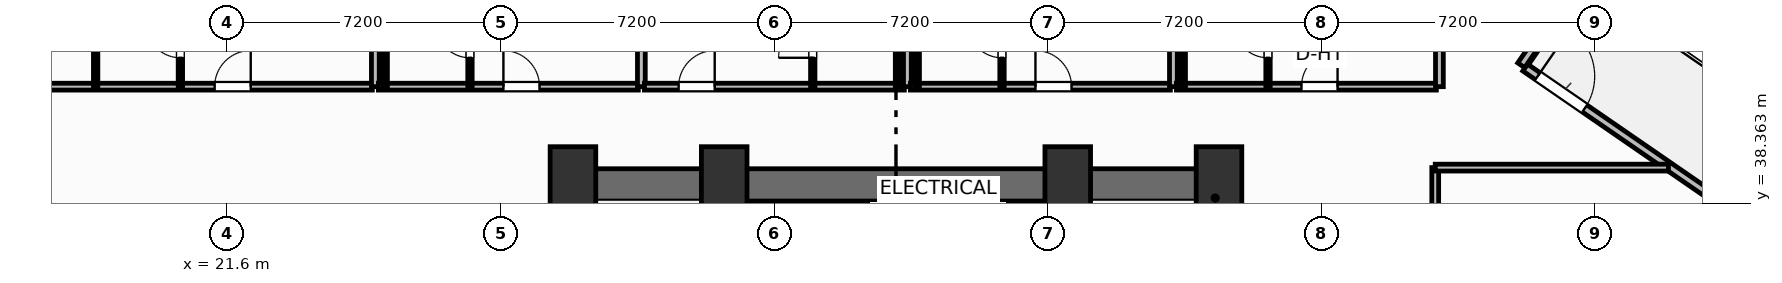
"""IFC4 building model, lengths in metres.
Left out: names, types, materials, properties, quantities, classifications, styles, units other than length and angle.
Written with IfcOpenShell. Run it as: python <this file> out.ifc"""

import sys

from ifc_helpers import new_model, si_unit, direction, frame, frame_2d, origin, origin_2d, place, context, subcontext, project, spatial, rectangle, extrude, element, fill, save


model = new_model("IFC4")
c1 = context("Model", 3, precision=1e-05, world=origin(), true_north=direction((0.0, 1.0)))
c2 = subcontext(c1, "Body", "Model", "MODEL_VIEW")
j1 = project(units=[si_unit("LENGTHUNIT", "METRE"), si_unit("PLANEANGLEUNIT", "RADIAN")], contexts=[c1])
p1 = place(None, origin())
s1 = spatial("IfcSite", under=j1, at=p1, CompositionType="ELEMENT")
p2 = place(p1, origin())
s2 = spatial("IfcBuilding", under=s1, at=p2, CompositionType="ELEMENT")
p3 = place(p2, frame((0.0, 0.0, 27.0)))
s3 = spatial("IfcBuildingStorey", under=s2, at=p3, CompositionType="ELEMENT", Elevation=27.0)
for number, where, z_axis, x_axis in (
    (1, (30.7, 39.05, 0.0), (0.0, 0.0, 1.0), (1.0, 0.0, 0.0)),
    (2, (34.68, 39.05, 0.0), (0.0, 0.0, 1.0), (1.0, 0.0, 0.0)),
    (3, (43.72, 39.05, 0.0), (0.0, 0.0, 1.0), (1.0, 0.0, 0.0)),
    (4, (47.7, 39.05, 0.0), (0.0, 0.0, 1.0), (1.0, 0.0, 0.0)),
):
    element("IfcColumn", number, at=place(p3, frame(where, z_axis=z_axis, x_axis=x_axis)), inside=s3, PredefinedType="COLUMN", context=c2, shape_type="SweptSolid", body=[
        extrude(rectangle(XDim=1.2, YDim=1.6, at=origin_2d()), origin(), (0.0, 0.0, 1.0), 3.7),
    ])
p4 = place(p3, frame((30.28, 38.845, 0.0), z_axis=(0.0, 0.0, 1.0), x_axis=(1.0, 0.0, 0.0)))
e5 = element("IfcWall", 5, at=p4, inside=s3, PredefinedType="SHEAR", context=c2, shape_type="SweptSolid", body=[
    extrude(rectangle(XDim=17.84, YDim=0.85, at=frame_2d((8.92, 0.0))), origin(), (0.0, 0.0, 1.0), 3.45),
])
for number, where, z_axis, x_axis in (
    (6, (30.705, 29.2, 0.0), (0.0, 0.0, 1.0), (0.0, 1.0, 0.0)),
    (7, (47.695, 29.2, 0.0), (0.0, 0.0, 1.0), (0.0, 1.0, 0.0)),
):
    element("IfcWall", number, at=place(p3, frame(where, z_axis=z_axis, x_axis=x_axis)), inside=s3, PredefinedType="SHEAR", context=c2, shape_type="SweptSolid", body=[
        extrude(rectangle(XDim=9.22, YDim=0.85, at=frame_2d((4.61, 0.0))), origin(), (0.0, 0.0, 1.0), 3.45),
    ])
p5 = place(p3, frame((34.64, 29.2, 0.0), z_axis=(0.0, 0.0, 1.0), x_axis=(0.0, 1.0, 0.0)))
e8 = element("IfcWall", 8, at=p5, inside=s3, PredefinedType="SHEAR", context=c2, shape_type="SweptSolid", body=[
    extrude(rectangle(XDim=9.22, YDim=0.25, at=frame_2d((4.61, 0.0))), origin(), (0.0, 0.0, 1.0), 3.45),
])
p6 = place(p5, frame((0.65, 0.0, 0.0)))
e9 = element("IfcOpeningElement", 9, at=p6, cuts=e8, PredefinedType="OPENING", context=c2, shape_type="SweptSolid", body=[
    extrude(rectangle(XDim=1.05, YDim=2.15, at=frame_2d((0.525, 1.075))), frame((0.0, 0.135, 0.0), z_axis=(0.0, -1.0, 0.0), x_axis=(1.0, 0.0, 0.0)), (0.0, 0.0, 1.0), 0.27),
])
p7 = place(p3, frame((43.76, 29.2, 0.0), z_axis=(0.0, 0.0, 1.0), x_axis=(0.0, 1.0, 0.0)))
e10 = element("IfcWall", 10, at=p7, inside=s3, PredefinedType="SHEAR", context=c2, shape_type="SweptSolid", body=[
    extrude(rectangle(XDim=9.22, YDim=0.25, at=frame_2d((4.61, 0.0))), origin(), (0.0, 0.0, 1.0), 3.45),
])
p8 = place(p7, frame((0.65, 0.0, 0.0)))
e11 = element("IfcOpeningElement", 11, at=p8, cuts=e10, PredefinedType="OPENING", context=c2, shape_type="SweptSolid", body=[
    extrude(rectangle(XDim=1.05, YDim=2.15, at=frame_2d((0.525, 1.075))), frame((0.0, 0.135, 0.0), z_axis=(0.0, -1.0, 0.0), x_axis=(1.0, 0.0, 0.0)), (0.0, 0.0, 1.0), 0.27),
])
p9 = place(p3, frame((55.757, 41.933, 0.0), z_axis=(0.0, 0.0, 1.0), x_axis=(0.823534636215, -0.567265989598, 0.0)))
e12 = element("IfcWall", 12, at=p9, inside=s3, PredefinedType="SOLIDWALL", context=c2, shape_type="SweptSolid", body=[
    extrude(rectangle(XDim=6.0, YDim=0.22, at=frame_2d((3.0, 0.0))), origin(), (0.0, 0.0, 1.0), 2.73),
])
p10 = place(p9, frame((0.4, 0.0, 0.0)))
e13 = element("IfcOpeningElement", 13, at=p10, cuts=e12, PredefinedType="OPENING", context=c2, shape_type="SweptSolid", body=[
    extrude(rectangle(XDim=1.5, YDim=2.25, at=frame_2d((0.75, 1.125))), frame((0.0, 0.12, 0.0), z_axis=(0.0, -1.0, 0.0), x_axis=(1.0, 0.0, 0.0)), (0.0, 0.0, 1.0), 0.24),
])
p11 = place(p3, frame((55.653, 41.993, 0.0), z_axis=(0.0, 0.0, 1.0), x_axis=(0.567273696173, 0.823529327729, 0.0)))
e14 = element("IfcWall", 14, at=p11, inside=s3, PredefinedType="SOLIDWALL", context=c2, shape_type="SweptSolid", body=[
    extrude(rectangle(XDim=2.1, YDim=0.22, at=frame_2d((1.05, 0.0))), origin(), (0.0, 0.0, 1.0), 2.73),
])
p12 = place(p3, frame((2.921, 41.43, 0.0), z_axis=(0.0, 0.0, 1.0), x_axis=(1.0, 0.0, 0.0)))
e15 = element("IfcWall", 15, at=p12, inside=s3, PredefinedType="PARTITIONING", context=c2, shape_type="SweptSolid", body=[
    extrude(rectangle(XDim=22.499, YDim=0.18, at=frame_2d((11.25, 0.0))), origin(), (0.0, 0.0, 1.0), 3.45),
])
p13 = place(p12, frame((18.35, 0.0, 0.0)))
e16 = element("IfcOpeningElement", 16, at=p13, cuts=e15, PredefinedType="OPENING", context=c2, shape_type="SweptSolid", body=[
    extrude(rectangle(XDim=0.95, YDim=2.15, at=frame_2d((0.475, 1.075))), frame((0.0, 0.1, 0.0), z_axis=(0.0, -1.0, 0.0), x_axis=(1.0, 0.0, 0.0)), (0.0, 0.0, 1.0), 0.2),
])
p14 = place(p3, frame((20.37, 41.43, 0.0), z_axis=(0.0, 0.0, 1.0), x_axis=(0.0, 1.0, 0.0)))
e17 = element("IfcWall", 17, at=p14, inside=s3, PredefinedType="PARTITIONING", context=c2, shape_type="SweptSolid", body=[
    extrude(rectangle(XDim=2.52, YDim=0.115, at=frame_2d((1.26, 0.0))), origin(), (0.0, 0.0, 1.0), 3.45),
])
p15 = place(p14, frame((0.76, 0.0, 0.0)))
e18 = element("IfcOpeningElement", 18, at=p15, cuts=e17, PredefinedType="OPENING", context=c2, shape_type="SweptSolid", body=[
    extrude(rectangle(XDim=0.9, YDim=2.05, at=frame_2d((0.45, 1.025))), frame((0.0, 0.067, 0.0), z_axis=(0.0, -1.0, 0.0), x_axis=(1.0, 0.0, 0.0)), (0.0, 0.0, 1.0), 0.135),
])
p16 = place(p3, frame((18.14, 41.43, 0.0), z_axis=(0.0, 0.0, 1.0), x_axis=(0.0, 1.0, 0.0)))
e19 = element("IfcWall", 19, at=p16, inside=s3, PredefinedType="PARTITIONING", context=c2, shape_type="SweptSolid", body=[
    extrude(rectangle(XDim=2.52, YDim=0.115, at=frame_2d((1.26, 0.0))), origin(), (0.0, 0.0, 1.0), 3.45),
])
p17 = place(p3, frame((25.5, 41.43, 0.0), z_axis=(0.0, 0.0, 1.0), x_axis=(0.0, 1.0, 0.0)))
e20 = element("IfcWall", 20, at=p17, inside=s3, PredefinedType="PARTITIONING", context=c2, shape_type="SweptSolid", body=[
    extrude(rectangle(XDim=14.57, YDim=0.205, at=frame_2d((7.285, 0.0))), origin(), (0.0, 0.0, 1.0), 3.45),
])
p18 = place(p3, frame((25.58, 41.43, 0.0), z_axis=(0.0, 0.0, 1.0), x_axis=(1.0, 0.0, 0.0)))
e21 = element("IfcWall", 21, at=p18, inside=s3, PredefinedType="PARTITIONING", context=c2, shape_type="SweptSolid", body=[
    extrude(rectangle(XDim=6.84, YDim=0.18, at=frame_2d((3.42, 0.0))), origin(), (0.0, 0.0, 1.0), 3.45),
])
p19 = place(p18, frame((3.29, 0.0, 0.0)))
e22 = element("IfcOpeningElement", 22, at=p19, cuts=e21, PredefinedType="OPENING", context=c2, shape_type="SweptSolid", body=[
    extrude(rectangle(XDim=0.95, YDim=2.15, at=frame_2d((0.475, 1.075))), frame((0.0, 0.1, 0.0), z_axis=(0.0, -1.0, 0.0), x_axis=(1.0, 0.0, 0.0)), (0.0, 0.0, 1.0), 0.2),
])
p20 = place(p3, frame((27.99, 41.43, 0.0), z_axis=(0.0, 0.0, 1.0), x_axis=(0.0, 1.0, 0.0)))
e23 = element("IfcWall", 23, at=p20, inside=s3, PredefinedType="PARTITIONING", context=c2, shape_type="SweptSolid", body=[
    extrude(rectangle(XDim=2.52, YDim=0.115, at=frame_2d((1.26, 0.0))), origin(), (0.0, 0.0, 1.0), 3.45),
])
p21 = place(p20, frame((0.76, 0.0, 0.0)))
e24 = element("IfcOpeningElement", 24, at=p21, cuts=e23, PredefinedType="OPENING", context=c2, shape_type="SweptSolid", body=[
    extrude(rectangle(XDim=0.9, YDim=2.05, at=frame_2d((0.45, 1.025))), frame((0.0, 0.067, 0.0), z_axis=(0.0, -1.0, 0.0), x_axis=(1.0, 0.0, 0.0)), (0.0, 0.0, 1.0), 0.135),
])
p22 = place(p3, frame((25.76, 41.43, 0.0), z_axis=(0.0, 0.0, 1.0), x_axis=(0.0, 1.0, 0.0)))
e25 = element("IfcWall", 25, at=p22, inside=s3, PredefinedType="PARTITIONING", context=c2, shape_type="SweptSolid", body=[
    extrude(rectangle(XDim=2.52, YDim=0.115, at=frame_2d((1.26, 0.0))), origin(), (0.0, 0.0, 1.0), 3.45),
])
p23 = place(p3, frame((32.5, 41.43, 0.0), z_axis=(0.0, 0.0, 1.0), x_axis=(0.0, 1.0, 0.0)))
e26 = element("IfcWall", 26, at=p23, inside=s3, PredefinedType="PARTITIONING", context=c2, shape_type="SweptSolid", body=[
    extrude(rectangle(XDim=14.57, YDim=0.205, at=frame_2d((7.285, 0.0))), origin(), (0.0, 0.0, 1.0), 3.45),
])
p24 = place(p3, frame((32.58, 41.43, 0.0), z_axis=(0.0, 0.0, 1.0), x_axis=(1.0, 0.0, 0.0)))
e27 = element("IfcWall", 27, at=p24, inside=s3, PredefinedType="PARTITIONING", context=c2, shape_type="SweptSolid", body=[
    extrude(rectangle(XDim=6.84, YDim=0.18, at=frame_2d((3.42, 0.0))), origin(), (0.0, 0.0, 1.0), 3.45),
])
p25 = place(p24, frame((0.9, 0.0, 0.0)))
e28 = element("IfcOpeningElement", 28, at=p25, cuts=e27, PredefinedType="OPENING", context=c2, shape_type="SweptSolid", body=[
    extrude(rectangle(XDim=0.95, YDim=2.15, at=frame_2d((0.475, 1.075))), frame((0.0, 0.1, 0.0), z_axis=(0.0, -1.0, 0.0), x_axis=(1.0, 0.0, 0.0)), (0.0, 0.0, 1.0), 0.2),
])
p26 = place(p3, frame((37.01, 41.43, 0.0), z_axis=(0.0, 0.0, 1.0), x_axis=(0.0, 1.0, 0.0)))
e29 = element("IfcWall", 29, at=p26, inside=s3, PredefinedType="PARTITIONING", context=c2, shape_type="SweptSolid", body=[
    extrude(rectangle(XDim=2.52, YDim=0.115, at=frame_2d((1.26, 0.0))), origin(), (0.0, 0.0, 1.0), 3.45),
])
p27 = place(p26, frame((0.76, 0.0, 0.0)))
e30 = element("IfcOpeningElement", 30, at=p27, cuts=e29, PredefinedType="OPENING", context=c2, shape_type="SweptSolid", body=[
    extrude(rectangle(XDim=0.9, YDim=2.05, at=frame_2d((0.45, 1.025))), frame((0.0, 0.067, 0.0), z_axis=(0.0, -1.0, 0.0), x_axis=(1.0, 0.0, 0.0)), (0.0, 0.0, 1.0), 0.135),
])
p28 = place(p3, frame((39.24, 41.43, 0.0), z_axis=(0.0, 0.0, 1.0), x_axis=(0.0, 1.0, 0.0)))
e31 = element("IfcWall", 31, at=p28, inside=s3, PredefinedType="PARTITIONING", context=c2, shape_type="SweptSolid", body=[
    extrude(rectangle(XDim=2.52, YDim=0.115, at=frame_2d((1.26, 0.0))), origin(), (0.0, 0.0, 1.0), 3.45),
])
p29 = place(p3, frame((39.5, 41.43, 0.0), z_axis=(0.0, 0.0, 1.0), x_axis=(0.0, 1.0, 0.0)))
e32 = element("IfcWall", 32, at=p29, inside=s3, PredefinedType="PARTITIONING", context=c2, shape_type="SweptSolid", body=[
    extrude(rectangle(XDim=14.215, YDim=0.205, at=frame_2d((7.107, 0.0))), origin(), (0.0, 0.0, 1.0), 3.45),
])
p30 = place(p3, frame((39.58, 41.43, 0.0), z_axis=(0.0, 0.0, 1.0), x_axis=(1.0, 0.0, 0.0)))
e33 = element("IfcWall", 33, at=p30, inside=s3, PredefinedType="PARTITIONING", context=c2, shape_type="SweptSolid", body=[
    extrude(rectangle(XDim=6.84, YDim=0.18, at=frame_2d((3.42, 0.0))), origin(), (0.0, 0.0, 1.0), 3.45),
])
p31 = place(p30, frame((3.29, 0.0, 0.0)))
e34 = element("IfcOpeningElement", 34, at=p31, cuts=e33, PredefinedType="OPENING", context=c2, shape_type="SweptSolid", body=[
    extrude(rectangle(XDim=0.95, YDim=2.15, at=frame_2d((0.475, 1.075))), frame((0.0, 0.1, 0.0), z_axis=(0.0, -1.0, 0.0), x_axis=(1.0, 0.0, 0.0)), (0.0, 0.0, 1.0), 0.2),
])
p32 = place(p3, frame((41.99, 41.43, 0.0), z_axis=(0.0, 0.0, 1.0), x_axis=(0.0, 1.0, 0.0)))
e35 = element("IfcWall", 35, at=p32, inside=s3, PredefinedType="PARTITIONING", context=c2, shape_type="SweptSolid", body=[
    extrude(rectangle(XDim=2.52, YDim=0.115, at=frame_2d((1.26, 0.0))), origin(), (0.0, 0.0, 1.0), 3.45),
])
p33 = place(p32, frame((0.76, 0.0, 0.0)))
e36 = element("IfcOpeningElement", 36, at=p33, cuts=e35, PredefinedType="OPENING", context=c2, shape_type="SweptSolid", body=[
    extrude(rectangle(XDim=0.9, YDim=2.05, at=frame_2d((0.45, 1.025))), frame((0.0, 0.067, 0.0), z_axis=(0.0, -1.0, 0.0), x_axis=(1.0, 0.0, 0.0)), (0.0, 0.0, 1.0), 0.135),
])
p34 = place(p3, frame((39.76, 41.43, 0.0), z_axis=(0.0, 0.0, 1.0), x_axis=(0.0, 1.0, 0.0)))
e37 = element("IfcWall", 37, at=p34, inside=s3, PredefinedType="PARTITIONING", context=c2, shape_type="SweptSolid", body=[
    extrude(rectangle(XDim=2.52, YDim=0.115, at=frame_2d((1.26, 0.0))), origin(), (0.0, 0.0, 1.0), 3.45),
])
p35 = place(p3, frame((46.5, 41.43, 0.0), z_axis=(0.0, 0.0, 1.0), x_axis=(0.0, 1.0, 0.0)))
e38 = element("IfcWall", 38, at=p35, inside=s3, PredefinedType="PARTITIONING", context=c2, shape_type="SweptSolid", body=[
    extrude(rectangle(XDim=6.843, YDim=0.205, at=frame_2d((3.421, 0.0))), origin(), (0.0, 0.0, 1.0), 2.58),
])
p36 = place(p3, frame((46.58, 41.43, 0.0), z_axis=(0.0, 0.0, 1.0), x_axis=(1.0, 0.0, 0.0)))
e39 = element("IfcWall", 39, at=p36, inside=s3, PredefinedType="PARTITIONING", context=c2, shape_type="SweptSolid", body=[
    extrude(rectangle(XDim=6.84, YDim=0.18, at=frame_2d((3.42, 0.0))), origin(), (0.0, 0.0, 1.0), 3.45),
])
p37 = place(p36, frame((3.29, 0.0, 0.0)))
e40 = element("IfcOpeningElement", 40, at=p37, cuts=e39, PredefinedType="OPENING", context=c2, shape_type="SweptSolid", body=[
    extrude(rectangle(XDim=0.95, YDim=2.15, at=frame_2d((0.475, 1.075))), frame((0.0, 0.1, 0.0), z_axis=(0.0, -1.0, 0.0), x_axis=(1.0, 0.0, 0.0)), (0.0, 0.0, 1.0), 0.2),
])
p38 = place(p3, frame((48.99, 41.43, 0.0), z_axis=(0.0, 0.0, 1.0), x_axis=(0.0, 1.0, 0.0)))
e41 = element("IfcWall", 41, at=p38, inside=s3, PredefinedType="PARTITIONING", context=c2, shape_type="SweptSolid", body=[
    extrude(rectangle(XDim=2.52, YDim=0.115, at=frame_2d((1.26, 0.0))), origin(), (0.0, 0.0, 1.0), 3.45),
])
p39 = place(p38, frame((0.76, 0.0, 0.0)))
e42 = element("IfcOpeningElement", 42, at=p39, cuts=e41, PredefinedType="OPENING", context=c2, shape_type="SweptSolid", body=[
    extrude(rectangle(XDim=0.9, YDim=2.05, at=frame_2d((0.45, 1.025))), frame((0.0, 0.067, 0.0), z_axis=(0.0, -1.0, 0.0), x_axis=(1.0, 0.0, 0.0)), (0.0, 0.0, 1.0), 0.135),
])
p40 = place(p3, frame((46.76, 41.43, 0.0), z_axis=(0.0, 0.0, 1.0), x_axis=(0.0, 1.0, 0.0)))
e43 = element("IfcWall", 43, at=p40, inside=s3, PredefinedType="PARTITIONING", context=c2, shape_type="SweptSolid", body=[
    extrude(rectangle(XDim=2.52, YDim=0.115, at=frame_2d((1.26, 0.0))), origin(), (0.0, 0.0, 1.0), 2.58),
])
p41 = place(p3, frame((53.5, 41.43, 0.0), z_axis=(0.0, 0.0, 1.0), x_axis=(0.0, 1.0, 0.0)))
e44 = element("IfcWall", 44, at=p41, inside=s3, PredefinedType="PARTITIONING", context=c2, shape_type="SweptSolid", body=[
    extrude(rectangle(XDim=4.571, YDim=0.205, at=frame_2d((2.286, 0.0))), origin(), (0.0, 0.0, 1.0), 3.45),
])
p42 = place(p3, frame((53.39, 19.24, 0.0), z_axis=(0.0, 0.0, 1.0), x_axis=(0.0, 1.0, 0.0)))
e45 = element("IfcWall", 45, at=p42, inside=s3, PredefinedType="PARTITIONING", context=c2, shape_type="SweptSolid", body=[
    extrude(rectangle(XDim=20.06, YDim=0.18, at=frame_2d((10.03, 0.0))), origin(), (0.0, 0.0, 1.0), 3.45),
])
p43 = place(p42, frame((7.7, 0.0, 0.0)))
e46 = element("IfcOpeningElement", 46, at=p43, cuts=e45, PredefinedType="OPENING", context=c2, shape_type="SweptSolid", body=[
    extrude(rectangle(XDim=0.95, YDim=2.05, at=frame_2d((0.475, 1.025))), frame((0.0, 0.1, 0.0), z_axis=(0.0, -1.0, 0.0), x_axis=(1.0, 0.0, 0.0)), (0.0, 0.0, 1.0), 0.2),
])
p44 = place(p3, frame((53.39, 39.3, 0.0), z_axis=(0.0, 0.0, 1.0), x_axis=(1.0, 0.0, 0.0)))
e47 = element("IfcWall", 47, at=p44, inside=s3, PredefinedType="PARTITIONING", context=c2, shape_type="SweptSolid", body=[
    extrude(rectangle(XDim=6.136, YDim=0.18, at=frame_2d((3.068, 0.0))), origin(), (0.0, 0.0, 1.0), 3.45),
])
p45 = place(p10, origin())
e48 = element("IfcDoor", 48, at=p45, inside=s3, OperationType="SINGLE_SWING_LEFT", PredefinedType="DOOR", context=c2, shape_type="SweptSolid", body=[
    extrude(rectangle(XDim=1.5, YDim=2.25, at=frame_2d((0.75, 1.125))), frame((0.0, 0.025, 0.0), z_axis=(0.0, -1.0, 0.0), x_axis=(1.0, 0.0, 0.0)), (0.0, 0.0, 1.0), 0.05),
])
fill(e13, e48)
p46 = place(p13, origin())
e49 = element("IfcDoor", 49, at=p46, inside=s3, OperationType="SINGLE_SWING_RIGHT", PredefinedType="DOOR", context=c2, shape_type="SweptSolid", body=[
    extrude(rectangle(XDim=0.95, YDim=2.15, at=frame_2d((0.475, 1.075))), frame((0.0, 0.025, 0.0), z_axis=(0.0, -1.0, 0.0), x_axis=(1.0, 0.0, 0.0)), (0.0, 0.0, 1.0), 0.05),
])
fill(e16, e49)
p47 = place(p15, origin())
e50 = element("IfcDoor", 50, at=p47, inside=s3, OperationType="SINGLE_SWING_RIGHT", PredefinedType="DOOR", context=c2, shape_type="SweptSolid", body=[
    extrude(rectangle(XDim=0.9, YDim=2.05, at=frame_2d((0.45, 1.025))), frame((0.0, 0.025, 0.0), z_axis=(0.0, -1.0, 0.0), x_axis=(1.0, 0.0, 0.0)), (0.0, 0.0, 1.0), 0.05),
])
fill(e18, e50)
p48 = place(p19, origin())
e51 = element("IfcDoor", 51, at=p48, inside=s3, OperationType="SINGLE_SWING_LEFT", PredefinedType="DOOR", context=c2, shape_type="SweptSolid", body=[
    extrude(rectangle(XDim=0.95, YDim=2.15, at=frame_2d((0.475, 1.075))), frame((0.0, 0.025, 0.0), z_axis=(0.0, -1.0, 0.0), x_axis=(1.0, 0.0, 0.0)), (0.0, 0.0, 1.0), 0.05),
])
fill(e22, e51)
p49 = place(p21, origin())
e52 = element("IfcDoor", 52, at=p49, inside=s3, OperationType="SINGLE_SWING_RIGHT", PredefinedType="DOOR", context=c2, shape_type="SweptSolid", body=[
    extrude(rectangle(XDim=0.9, YDim=2.05, at=frame_2d((0.45, 1.025))), frame((0.0, 0.025, 0.0), z_axis=(0.0, -1.0, 0.0), x_axis=(1.0, 0.0, 0.0)), (0.0, 0.0, 1.0), 0.05),
])
fill(e24, e52)
p50 = place(p25, origin())
e53 = element("IfcDoor", 53, at=p50, inside=s3, OperationType="SINGLE_SWING_RIGHT", PredefinedType="DOOR", context=c2, shape_type="SweptSolid", body=[
    extrude(rectangle(XDim=0.95, YDim=2.15, at=frame_2d((0.475, 1.075))), frame((0.0, 0.025, 0.0), z_axis=(0.0, -1.0, 0.0), x_axis=(1.0, 0.0, 0.0)), (0.0, 0.0, 1.0), 0.05),
])
fill(e28, e53)
p51 = place(p27, origin())
e54 = element("IfcDoor", 54, at=p51, inside=s3, OperationType="SINGLE_SWING_LEFT", PredefinedType="DOOR", context=c2, shape_type="SweptSolid", body=[
    extrude(rectangle(XDim=0.9, YDim=2.05, at=frame_2d((0.45, 1.025))), frame((0.0, 0.025, 0.0), z_axis=(0.0, -1.0, 0.0), x_axis=(1.0, 0.0, 0.0)), (0.0, 0.0, 1.0), 0.05),
])
fill(e30, e54)
p52 = place(p31, origin())
e55 = element("IfcDoor", 55, at=p52, inside=s3, OperationType="SINGLE_SWING_LEFT", PredefinedType="DOOR", context=c2, shape_type="SweptSolid", body=[
    extrude(rectangle(XDim=0.95, YDim=2.15, at=frame_2d((0.475, 1.075))), frame((0.0, 0.025, 0.0), z_axis=(0.0, -1.0, 0.0), x_axis=(1.0, 0.0, 0.0)), (0.0, 0.0, 1.0), 0.05),
])
fill(e34, e55)
p53 = place(p33, origin())
e56 = element("IfcDoor", 56, at=p53, inside=s3, OperationType="SINGLE_SWING_RIGHT", PredefinedType="DOOR", context=c2, shape_type="SweptSolid", body=[
    extrude(rectangle(XDim=0.9, YDim=2.05, at=frame_2d((0.45, 1.025))), frame((0.0, 0.025, 0.0), z_axis=(0.0, -1.0, 0.0), x_axis=(1.0, 0.0, 0.0)), (0.0, 0.0, 1.0), 0.05),
])
fill(e36, e56)
p54 = place(p37, origin())
e57 = element("IfcDoor", 57, at=p54, inside=s3, OperationType="SINGLE_SWING_RIGHT", PredefinedType="DOOR", context=c2, shape_type="SweptSolid", body=[
    extrude(rectangle(XDim=0.95, YDim=2.15, at=frame_2d((0.475, 1.075))), frame((0.0, 0.025, 0.0), z_axis=(0.0, -1.0, 0.0), x_axis=(1.0, 0.0, 0.0)), (0.0, 0.0, 1.0), 0.05),
])
fill(e40, e57)
p55 = place(p39, origin())
e58 = element("IfcDoor", 58, at=p55, inside=s3, OperationType="SINGLE_SWING_RIGHT", PredefinedType="DOOR", context=c2, shape_type="SweptSolid", body=[
    extrude(rectangle(XDim=0.9, YDim=2.05, at=frame_2d((0.45, 1.025))), frame((0.0, 0.025, 0.0), z_axis=(0.0, -1.0, 0.0), x_axis=(1.0, 0.0, 0.0)), (0.0, 0.0, 1.0), 0.05),
])
fill(e42, e58)
save(model, sys.argv[1])
